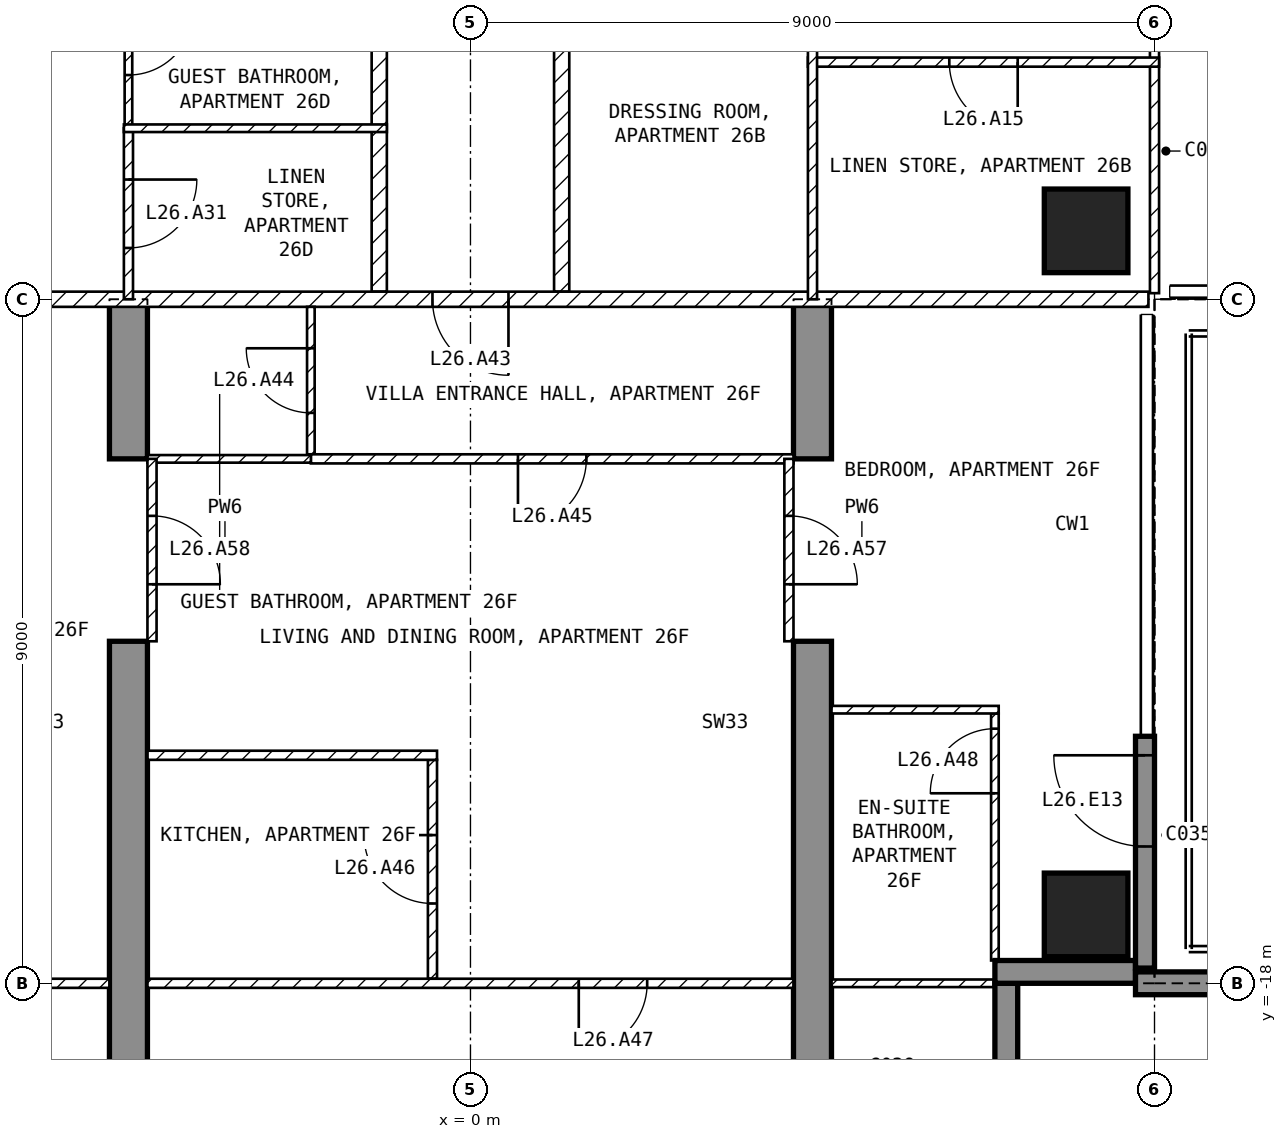
"""IFC4 building model, lengths in metres.
Left out: names, types, materials, properties, quantities, classifications, styles, units other than length and angle.
Written with IfcOpenShell. Run it as: python <this file> out.ifc"""

import sys

from ifc_helpers import new_model, si_unit, direction, frame, frame_2d, origin, origin_2d, place, context, subcontext, project, spatial, polyline, rectangle, outline, extrude, element, fill, save


model = new_model("IFC4")
c1 = context("Model", 3, precision=1e-05, world=origin(), true_north=direction((0.0, 1.0)))
c2 = subcontext(c1, "Body", "Model", "MODEL_VIEW")
j1 = project(units=[si_unit("LENGTHUNIT", "METRE"), si_unit("PLANEANGLEUNIT", "RADIAN")], contexts=[c1])
p1 = place(None, origin())
s1 = spatial("IfcSite", under=j1, at=p1, CompositionType="ELEMENT")
p2 = place(p1, origin())
s2 = spatial("IfcBuilding", under=s1, at=p2, CompositionType="ELEMENT")
p3 = place(p2, frame((0.0, 0.0, 112.9)))
s3 = spatial("IfcBuildingStorey", under=s2, at=p3, CompositionType="ELEMENT", Elevation=112.9)
for number, where, z_axis, x_axis in (
    (1, (8.1, -17.1, -0.25), (0.0, 0.0, 1.0), (1.0, 0.0, 0.0)),
    (2, (8.1, -8.1, -0.25), (0.0, 0.0, 1.0), (1.0, 0.0, 0.0)),
):
    element("IfcColumn", number, at=place(p3, frame(where, z_axis=z_axis, x_axis=x_axis)), inside=s3, PredefinedType="COLUMN", context=c2, shape_type="SweptSolid", body=[
        extrude(rectangle(XDim=1.1, YDim=1.1, at=origin_2d()), origin(), (0.0, 0.0, 1.0), 3.5),
    ])
for number, where, z_axis, x_axis in (
    (3, (-4.75, -20.15, -0.25), (1.0, 0.0, 0.0), (0.0, 1.0, 0.0)),
    (4, (4.25, -20.15, -0.25), (1.0, 0.0, 0.0), (0.0, 1.0, 0.0)),
):
    element("IfcWall", number, at=place(p3, frame(where, z_axis=z_axis, x_axis=x_axis)), inside=s3, PredefinedType="SHEAR", context=c2, shape_type="SweptSolid", body=[
        extrude(outline(polyline([(0.0, 0.0), (6.65, 0.0), (6.65, 2.65), (9.05, 2.65), (9.05, 0.0), (11.15, 0.0), (11.15, 3.5), (0.0, 3.5), (0.0, 0.0)])), origin(), (0.0, 0.0, 1.0), 0.5),
    ])
p4 = place(p3, frame((8.875, -17.8, 0.0), z_axis=(0.0, 0.0, 1.0), x_axis=(0.0, 1.0, 0.0)))
e5 = element("IfcWall", 5, at=p4, inside=s3, PredefinedType="SOLIDWALL", context=c2, shape_type="SweptSolid", body=[
    extrude(rectangle(XDim=3.05, YDim=0.25, at=frame_2d((1.525, 0.0))), origin(), (0.0, 0.0, 1.0), 3.25),
])
p5 = place(p4, frame((1.6, 0.0, 0.0)))
e6 = element("IfcOpeningElement", 6, at=p5, cuts=e5, PredefinedType="OPENING", context=c2, shape_type="SweptSolid", body=[
    extrude(rectangle(XDim=1.2, YDim=2.4, at=frame_2d((0.6, 1.2))), frame((0.0, 0.135, 0.0), z_axis=(0.0, -1.0, 0.0), x_axis=(1.0, 0.0, 0.0)), (0.0, 0.0, 1.0), 0.27),
])
p6 = place(p3, frame((7.05, -19.8, 0.0), z_axis=(0.0, 0.0, 1.0), x_axis=(0.0, 1.0, 0.0)))
e7 = element("IfcWall", 7, at=p6, inside=s3, PredefinedType="SOLIDWALL", context=c2, shape_type="SweptSolid", body=[
    extrude(rectangle(XDim=1.8, YDim=0.3, at=frame_2d((0.9, 0.0))), origin(), (0.0, 0.0, 1.0), 3.25),
])
p7 = place(p3, frame((6.9, -17.85, 0.0), z_axis=(0.0, 0.0, 1.0), x_axis=(1.0, 0.0, 0.0)))
e8 = element("IfcWall", 8, at=p7, inside=s3, PredefinedType="SOLIDWALL", context=c2, shape_type="SweptSolid", body=[
    extrude(rectangle(XDim=1.85, YDim=0.3, at=frame_2d((0.925, 0.0))), origin(), (0.0, 0.0, 1.0), 3.25),
])
p8 = place(p3, frame((8.75, -18.0, 0.0), z_axis=(0.0, 0.0, 1.0), x_axis=(1.0, 0.0, 0.0)))
e9 = element("IfcWall", 9, at=p8, inside=s3, PredefinedType="SOLIDWALL", context=c2, shape_type="SweptSolid", body=[
    extrude(rectangle(XDim=2.99, YDim=0.3, at=frame_2d((1.495, 0.0))), origin(), (0.0, 0.0, 1.0), 3.25),
])
for number, where, z_axis, x_axis in (
    (10, (1.2, -4.6, 0.0), (0.0, 0.0, 1.0), (0.0, -1.0, 0.0)),
    (11, (-1.2, -8.9, 0.0), (0.0, 0.0, 1.0), (0.0, 1.0, 0.0)),
):
    element("IfcWall", number, at=place(p3, frame(where, z_axis=z_axis, x_axis=x_axis)), inside=s3, PredefinedType="PARTITIONING", context=c2, shape_type="SweptSolid", body=[
        extrude(rectangle(XDim=4.3, YDim=0.2, at=frame_2d((2.15, 0.0))), origin(), (0.0, 0.0, 1.0), 3.25),
    ])
p9 = place(p3, frame((8.92, -9.0, 0.0), z_axis=(0.0, 0.0, 1.0), x_axis=(-1.0, 0.0, 0.0)))
e12 = element("IfcWall", 12, at=p9, inside=s3, PredefinedType="PARTITIONING", context=c2, shape_type="SweptSolid", body=[
    extrude(rectangle(XDim=17.84, YDim=0.2, at=frame_2d((8.92, 0.0))), origin(), (0.0, 0.0, 1.0), 3.25),
])
p10 = place(p9, frame((8.42, 0.0, 0.0)))
e13 = element("IfcOpeningElement", 13, at=p10, cuts=e12, PredefinedType="OPENING", context=c2, shape_type="SweptSolid", body=[
    extrude(rectangle(XDim=1.0, YDim=2.1, at=frame_2d((0.5, 1.05))), frame((0.0, 0.11, 0.0), z_axis=(0.0, -1.0, 0.0), x_axis=(1.0, 0.0, 0.0)), (0.0, 0.0, 1.0), 0.22),
])
p11 = place(p3, frame((9.0, -8.92, 0.0), z_axis=(0.0, 0.0, 1.0), x_axis=(0.0, 1.0, 0.0)))
e14 = element("IfcWall", 14, at=p11, inside=s3, PredefinedType="PARTITIONING", context=c2, shape_type="SweptSolid", body=[
    extrude(rectangle(XDim=7.62, YDim=0.12, at=frame_2d((3.81, 0.0))), origin(), (0.0, 0.0, 1.0), 3.25),
])
p12 = place(p11, frame((5.12, 0.0, 0.0)))
e15 = element("IfcOpeningElement", 15, at=p12, cuts=e14, PredefinedType="OPENING", context=c2, shape_type="SweptSolid", body=[
    extrude(rectangle(XDim=0.9, YDim=2.1, at=frame_2d((0.45, 1.05))), frame((0.0, 0.07, 0.0), z_axis=(0.0, -1.0, 0.0), x_axis=(1.0, 0.0, 0.0)), (0.0, 0.0, 1.0), 0.14),
])
p13 = place(p3, frame((9.06, -5.88, 0.0), z_axis=(0.0, 0.0, 1.0), x_axis=(-1.0, 0.0, 0.0)))
e16 = element("IfcWall", 16, at=p13, inside=s3, PredefinedType="PARTITIONING", context=c2, shape_type="SweptSolid", body=[
    extrude(rectangle(XDim=4.62, YDim=0.12, at=frame_2d((2.31, 0.0))), origin(), (0.0, 0.0, 1.0), 3.25),
])
p14 = place(p13, frame((1.86, 0.0, 0.0)))
e17 = element("IfcOpeningElement", 17, at=p14, cuts=e16, PredefinedType="OPENING", context=c2, shape_type="SweptSolid", body=[
    extrude(rectangle(XDim=0.9, YDim=2.1, at=frame_2d((0.45, 1.05))), frame((0.0, 0.07, 0.0), z_axis=(0.0, -1.0, 0.0), x_axis=(1.0, 0.0, 0.0)), (0.0, 0.0, 1.0), 0.14),
])
p15 = place(p3, frame((4.5, -9.0, 0.0), z_axis=(0.0, 0.0, 1.0), x_axis=(0.0, 1.0, 0.0)))
e18 = element("IfcWall", 18, at=p15, inside=s3, PredefinedType="PARTITIONING", context=c2, shape_type="SweptSolid", body=[
    extrude(rectangle(XDim=4.5, YDim=0.12, at=frame_2d((2.25, 0.0))), origin(), (0.0, 0.0, 1.0), 3.25),
])
p16 = place(p15, frame((3.36, 0.0, 0.0)))
e19 = element("IfcOpeningElement", 19, at=p16, cuts=e18, PredefinedType="OPENING", context=c2, shape_type="SweptSolid", body=[
    extrude(rectangle(XDim=0.9, YDim=2.1, at=frame_2d((0.45, 1.05))), frame((0.0, 0.07, 0.0), z_axis=(0.0, -1.0, 0.0), x_axis=(1.0, 0.0, 0.0)), (0.0, 0.0, 1.0), 0.14),
])
p17 = place(p3, frame((-4.5, -4.5, 0.0), z_axis=(0.0, 0.0, 1.0), x_axis=(0.0, -1.0, 0.0)))
e20 = element("IfcWall", 20, at=p17, inside=s3, PredefinedType="PARTITIONING", context=c2, shape_type="SweptSolid", body=[
    extrude(rectangle(XDim=2.25, YDim=0.1, at=frame_2d((1.125, 0.0))), origin(), (0.0, 0.0, 1.0), 3.25),
])
p18 = place(p17, frame((0.7, 0.0, 0.0)))
e21 = element("IfcOpeningElement", 21, at=p18, cuts=e20, PredefinedType="OPENING", context=c2, shape_type="SweptSolid", body=[
    extrude(rectangle(XDim=0.85, YDim=2.1, at=frame_2d((0.425, 1.05))), frame((0.0, 0.06, 0.0), z_axis=(0.0, -1.0, 0.0), x_axis=(1.0, 0.0, 0.0)), (0.0, 0.0, 1.0), 0.12),
])
p19 = place(p3, frame((-4.5, -6.75, 0.0), z_axis=(0.0, 0.0, 1.0), x_axis=(0.0, -1.0, 0.0)))
e22 = element("IfcWall", 22, at=p19, inside=s3, PredefinedType="PARTITIONING", context=c2, shape_type="SweptSolid", body=[
    extrude(rectangle(XDim=2.25, YDim=0.12, at=frame_2d((1.125, 0.0))), origin(), (0.0, 0.0, 1.0), 3.25),
])
p20 = place(p19, frame((0.675, 0.0, 0.0)))
e23 = element("IfcOpeningElement", 23, at=p20, cuts=e22, PredefinedType="OPENING", context=c2, shape_type="SweptSolid", body=[
    extrude(rectangle(XDim=0.9, YDim=2.1, at=frame_2d((0.45, 1.05))), frame((0.0, 0.07, 0.0), z_axis=(0.0, -1.0, 0.0), x_axis=(1.0, 0.0, 0.0)), (0.0, 0.0, 1.0), 0.14),
])
p21 = place(p3, frame((-1.1, -6.75, 0.0), z_axis=(0.0, 0.0, 1.0), x_axis=(-1.0, 0.0, 0.0)))
e24 = element("IfcWall", 24, at=p21, inside=s3, PredefinedType="PARTITIONING", context=c2, shape_type="SweptSolid", body=[
    extrude(rectangle(XDim=3.46, YDim=0.1, at=frame_2d((1.73, 0.0))), origin(), (0.0, 0.0, 1.0), 3.25),
])
p22 = place(p3, frame((-2.1, -11.04, 0.0), z_axis=(0.0, 0.0, 1.0), x_axis=(0.0, 1.0, 0.0)))
e25 = element("IfcWall", 25, at=p22, inside=s3, PredefinedType="PARTITIONING", context=c2, shape_type="SweptSolid", body=[
    extrude(rectangle(XDim=1.94, YDim=0.1, at=frame_2d((0.97, 0.0))), origin(), (0.0, 0.0, 1.0), 3.25),
])
p23 = place(p22, frame((0.545, 0.0, 0.0)))
e26 = element("IfcOpeningElement", 26, at=p23, cuts=e25, PredefinedType="OPENING", context=c2, shape_type="SweptSolid", body=[
    extrude(rectangle(XDim=0.85, YDim=2.1, at=frame_2d((0.425, 1.05))), frame((0.0, 0.06, 0.0), z_axis=(0.0, -1.0, 0.0), x_axis=(1.0, 0.0, 0.0)), (0.0, 0.0, 1.0), 0.12),
])
p24 = place(p3, frame((4.25, -11.1, 0.0), z_axis=(0.0, 0.0, 1.0), x_axis=(-1.0, 0.0, 0.0)))
e27 = element("IfcWall", 27, at=p24, inside=s3, PredefinedType="PARTITIONING", context=c2, shape_type="SweptSolid", body=[
    extrude(rectangle(XDim=6.35, YDim=0.12, at=frame_2d((3.175, 0.0))), origin(), (0.0, 0.0, 1.0), 3.25),
])
p25 = place(p24, frame((2.725, 0.0, 0.0)))
e28 = element("IfcOpeningElement", 28, at=p25, cuts=e27, PredefinedType="OPENING", context=c2, shape_type="SweptSolid", body=[
    extrude(rectangle(XDim=0.9, YDim=2.1, at=frame_2d((0.45, 1.05))), frame((0.0, 0.07, 0.0), z_axis=(0.0, -1.0, 0.0), x_axis=(1.0, 0.0, 0.0)), (0.0, 0.0, 1.0), 0.14),
])
p26 = place(p3, frame((-2.1, -11.1, 0.0), z_axis=(0.0, 0.0, 1.0), x_axis=(-1.0, 0.0, 0.0)))
e29 = element("IfcWall", 29, at=p26, inside=s3, PredefinedType="PARTITIONING", context=c2, shape_type="SweptSolid", body=[
    extrude(rectangle(XDim=2.15, YDim=0.1, at=frame_2d((1.075, 0.0))), origin(), (0.0, 0.0, 1.0), 3.25),
])
p27 = place(p3, frame((-0.5, -17.94, 0.0), z_axis=(0.0, 0.0, 1.0), x_axis=(0.0, 1.0, 0.0)))
e30 = element("IfcWall", 30, at=p27, inside=s3, PredefinedType="PARTITIONING", context=c2, shape_type="SweptSolid", body=[
    extrude(rectangle(XDim=2.88, YDim=0.12, at=frame_2d((1.44, 0.0))), origin(), (0.0, 0.0, 1.0), 3.25),
])
p28 = place(p27, frame((0.99, 0.0, 0.0)))
e31 = element("IfcOpeningElement", 31, at=p28, cuts=e30, PredefinedType="OPENING", context=c2, shape_type="SweptSolid", body=[
    extrude(rectangle(XDim=0.9, YDim=2.1, at=frame_2d((0.45, 1.05))), frame((0.0, 0.07, 0.0), z_axis=(0.0, -1.0, 0.0), x_axis=(1.0, 0.0, 0.0)), (0.0, 0.0, 1.0), 0.14),
])
p29 = place(p3, frame((-0.44, -15.0, 0.0), z_axis=(0.0, 0.0, 1.0), x_axis=(-1.0, 0.0, 0.0)))
e32 = element("IfcWall", 32, at=p29, inside=s3, PredefinedType="PARTITIONING", context=c2, shape_type="SweptSolid", body=[
    extrude(rectangle(XDim=3.81, YDim=0.12, at=frame_2d((1.905, 0.0))), origin(), (0.0, 0.0, 1.0), 3.25),
])
p30 = place(p3, frame((4.25, -18.0, 0.0), z_axis=(0.0, 0.0, 1.0), x_axis=(-1.0, 0.0, 0.0)))
e33 = element("IfcWall", 33, at=p30, inside=s3, PredefinedType="PARTITIONING", context=c2, shape_type="SweptSolid", body=[
    extrude(rectangle(XDim=8.5, YDim=0.12, at=frame_2d((4.25, 0.0))), origin(), (0.0, 0.0, 1.0), 3.25),
])
p31 = place(p30, frame((1.925, 0.0, 0.0)))
e34 = element("IfcOpeningElement", 34, at=p31, cuts=e33, PredefinedType="OPENING", context=c2, shape_type="SweptSolid", body=[
    extrude(rectangle(XDim=0.9, YDim=2.1, at=frame_2d((0.45, 1.05))), frame((0.0, 0.07, 0.0), z_axis=(0.0, -1.0, 0.0), x_axis=(1.0, 0.0, 0.0)), (0.0, 0.0, 1.0), 0.14),
])
p32 = place(p3, frame((6.9, -17.7, 0.0), z_axis=(0.0, 0.0, 1.0), x_axis=(0.0, 1.0, 0.0)))
e35 = element("IfcWall", 35, at=p32, inside=s3, PredefinedType="PARTITIONING", context=c2, shape_type="SweptSolid", body=[
    extrude(rectangle(XDim=3.25, YDim=0.1, at=frame_2d((1.625, 0.0))), origin(), (0.0, 0.0, 1.0), 3.25),
])
p33 = place(p32, frame((2.2, 0.0, 0.0)))
e36 = element("IfcOpeningElement", 36, at=p33, cuts=e35, PredefinedType="OPENING", context=c2, shape_type="SweptSolid", body=[
    extrude(rectangle(XDim=0.85, YDim=2.1, at=frame_2d((0.425, 1.05))), frame((0.0, 0.06, 0.0), z_axis=(0.0, -1.0, 0.0), x_axis=(1.0, 0.0, 0.0)), (0.0, 0.0, 1.0), 0.12),
])
p34 = place(p3, frame((6.95, -14.4, 0.0), z_axis=(0.0, 0.0, 1.0), x_axis=(-1.0, 0.0, 0.0)))
e37 = element("IfcWall", 37, at=p34, inside=s3, PredefinedType="PARTITIONING", context=c2, shape_type="SweptSolid", body=[
    extrude(rectangle(XDim=2.2, YDim=0.1, at=frame_2d((1.1, 0.0))), origin(), (0.0, 0.0, 1.0), 3.25),
])
p35 = place(p3, frame((7.12, -18.0, 0.0), z_axis=(0.0, 0.0, 1.0), x_axis=(-1.0, 0.0, 0.0)))
e38 = element("IfcWall", 38, at=p35, inside=s3, PredefinedType="PARTITIONING", context=c2, shape_type="SweptSolid", body=[
    extrude(rectangle(XDim=2.37, YDim=0.1, at=frame_2d((1.185, 0.0))), origin(), (0.0, 0.0, 1.0), 3.25),
])
p36 = place(p3, frame((-4.75, -18.0, 0.0), z_axis=(0.0, 0.0, 1.0), x_axis=(-1.0, 0.0, 0.0)))
e39 = element("IfcWall", 39, at=p36, inside=s3, PredefinedType="PARTITIONING", context=c2, shape_type="SweptSolid", body=[
    extrude(rectangle(XDim=2.37, YDim=0.12, at=frame_2d((1.185, 0.0))), origin(), (0.0, 0.0, 1.0), 3.25),
])
p37 = place(p3, frame((4.19, -11.1, 0.0), z_axis=(0.0, 0.0, 1.0), x_axis=(0.0, -1.0, 0.0)))
e40 = element("IfcWall", 40, at=p37, inside=s3, PredefinedType="PARTITIONING", context=c2, shape_type="SweptSolid", body=[
    extrude(rectangle(XDim=2.4, YDim=0.12, at=frame_2d((1.2, 0.0))), origin(), (0.0, 0.0, 1.0), 2.4),
])
p38 = place(p37, frame((0.75, 0.0, 0.0)))
e41 = element("IfcOpeningElement", 41, at=p38, cuts=e40, PredefinedType="OPENING", context=c2, shape_type="SweptSolid", body=[
    extrude(rectangle(XDim=0.9, YDim=2.1, at=frame_2d((0.45, 1.05))), frame((0.0, 0.07, 0.0), z_axis=(0.0, -1.0, 0.0), x_axis=(1.0, 0.0, 0.0)), (0.0, 0.0, 1.0), 0.14),
])
p39 = place(p3, frame((-4.19, -11.1, 0.0), z_axis=(0.0, 0.0, 1.0), x_axis=(0.0, -1.0, 0.0)))
e42 = element("IfcWall", 42, at=p39, inside=s3, PredefinedType="PARTITIONING", context=c2, shape_type="SweptSolid", body=[
    extrude(rectangle(XDim=2.4, YDim=0.12, at=frame_2d((1.2, 0.0))), origin(), (0.0, 0.0, 1.0), 2.4),
])
p40 = place(p39, frame((0.75, 0.0, 0.0)))
e43 = element("IfcOpeningElement", 43, at=p40, cuts=e42, PredefinedType="OPENING", context=c2, shape_type="SweptSolid", body=[
    extrude(rectangle(XDim=0.9, YDim=2.1, at=frame_2d((0.45, 1.05))), frame((0.0, 0.07, 0.0), z_axis=(0.0, -1.0, 0.0), x_axis=(1.0, 0.0, 0.0)), (0.0, 0.0, 1.0), 0.14),
])
p41 = place(p5, origin())
e44 = element("IfcDoor", 44, at=p41, inside=s3, OperationType="SINGLE_SWING_RIGHT", PredefinedType="DOOR", context=c2, shape_type="SweptSolid", body=[
    extrude(rectangle(XDim=1.2, YDim=2.4, at=frame_2d((0.6, 1.2))), frame((0.0, 0.025, 0.0), z_axis=(0.0, -1.0, 0.0), x_axis=(1.0, 0.0, 0.0)), (0.0, 0.0, 1.0), 0.05),
])
fill(e6, e44)
p42 = place(p14, origin())
e45 = element("IfcDoor", 45, at=p42, inside=s3, OperationType="SINGLE_SWING_LEFT", PredefinedType="DOOR", context=c2, shape_type="SweptSolid", body=[
    extrude(rectangle(XDim=0.9, YDim=2.1, at=frame_2d((0.45, 1.05))), frame((0.0, 0.025, 0.0), z_axis=(0.0, -1.0, 0.0), x_axis=(1.0, 0.0, 0.0)), (0.0, 0.0, 1.0), 0.05),
])
fill(e17, e45)
p43 = place(p18, origin())
e46 = element("IfcDoor", 46, at=p43, inside=s3, OperationType="SINGLE_SWING_LEFT", PredefinedType="DOOR", context=c2, shape_type="SweptSolid", body=[
    extrude(rectangle(XDim=0.85, YDim=2.1, at=frame_2d((0.425, 1.05))), frame((0.0, 0.025, 0.0), z_axis=(0.0, -1.0, 0.0), x_axis=(1.0, 0.0, 0.0)), (0.0, 0.0, 1.0), 0.05),
])
fill(e21, e46)
p44 = place(p20, origin())
e47 = element("IfcDoor", 47, at=p44, inside=s3, OperationType="SINGLE_SWING_LEFT", PredefinedType="DOOR", context=c2, shape_type="SweptSolid", body=[
    extrude(rectangle(XDim=0.9, YDim=2.1, at=frame_2d((0.45, 1.05))), frame((0.0, 0.025, 0.0), z_axis=(0.0, -1.0, 0.0), x_axis=(1.0, 0.0, 0.0)), (0.0, 0.0, 1.0), 0.05),
])
fill(e23, e47)
p45 = place(p10, origin())
e48 = element("IfcDoor", 48, at=p45, inside=s3, OperationType="SINGLE_SWING_LEFT", PredefinedType="DOOR", context=c2, shape_type="SweptSolid", body=[
    extrude(rectangle(XDim=1.0, YDim=2.1, at=frame_2d((0.5, 1.05))), frame((0.0, 0.025, 0.0), z_axis=(0.0, -1.0, 0.0), x_axis=(1.0, 0.0, 0.0)), (0.0, 0.0, 1.0), 0.05),
])
fill(e13, e48)
p46 = place(p23, origin())
e49 = element("IfcDoor", 49, at=p46, inside=s3, OperationType="SINGLE_SWING_RIGHT", PredefinedType="DOOR", context=c2, shape_type="SweptSolid", body=[
    extrude(rectangle(XDim=0.85, YDim=2.1, at=frame_2d((0.425, 1.05))), frame((0.0, 0.025, 0.0), z_axis=(0.0, -1.0, 0.0), x_axis=(1.0, 0.0, 0.0)), (0.0, 0.0, 1.0), 0.05),
])
fill(e26, e49)
p47 = place(p25, origin())
e50 = element("IfcDoor", 50, at=p47, inside=s3, OperationType="SINGLE_SWING_RIGHT", PredefinedType="DOOR", context=c2, shape_type="SweptSolid", body=[
    extrude(rectangle(XDim=0.9, YDim=2.1, at=frame_2d((0.45, 1.05))), frame((0.0, 0.025, 0.0), z_axis=(0.0, -1.0, 0.0), x_axis=(1.0, 0.0, 0.0)), (0.0, 0.0, 1.0), 0.05),
])
fill(e28, e50)
p48 = place(p28, origin())
e51 = element("IfcDoor", 51, at=p48, inside=s3, OperationType="SINGLE_SWING_RIGHT", PredefinedType="DOOR", context=c2, shape_type="SweptSolid", body=[
    extrude(rectangle(XDim=0.9, YDim=2.1, at=frame_2d((0.45, 1.05))), frame((0.0, 0.025, 0.0), z_axis=(0.0, -1.0, 0.0), x_axis=(1.0, 0.0, 0.0)), (0.0, 0.0, 1.0), 0.05),
])
fill(e31, e51)
p49 = place(p31, origin())
e52 = element("IfcDoor", 52, at=p49, inside=s3, OperationType="SINGLE_SWING_RIGHT", PredefinedType="DOOR", context=c2, shape_type="SweptSolid", body=[
    extrude(rectangle(XDim=0.9, YDim=2.1, at=frame_2d((0.45, 1.05))), frame((0.0, 0.025, 0.0), z_axis=(0.0, -1.0, 0.0), x_axis=(1.0, 0.0, 0.0)), (0.0, 0.0, 1.0), 0.05),
])
fill(e34, e52)
p50 = place(p33, origin())
e53 = element("IfcDoor", 53, at=p50, inside=s3, OperationType="SINGLE_SWING_LEFT", PredefinedType="DOOR", context=c2, shape_type="SweptSolid", body=[
    extrude(rectangle(XDim=0.85, YDim=2.1, at=frame_2d((0.425, 1.05))), frame((0.0, 0.025, 0.0), z_axis=(0.0, -1.0, 0.0), x_axis=(1.0, 0.0, 0.0)), (0.0, 0.0, 1.0), 0.05),
])
fill(e36, e53)
p51 = place(p38, origin())
e54 = element("IfcDoor", 54, at=p51, inside=s3, OperationType="SINGLE_SWING_RIGHT", PredefinedType="DOOR", context=c2, shape_type="SweptSolid", body=[
    extrude(rectangle(XDim=0.9, YDim=2.1, at=frame_2d((0.45, 1.05))), frame((0.0, 0.025, 0.0), z_axis=(0.0, -1.0, 0.0), x_axis=(1.0, 0.0, 0.0)), (0.0, 0.0, 1.0), 0.05),
])
fill(e41, e54)
p52 = place(p40, origin())
e55 = element("IfcDoor", 55, at=p52, inside=s3, OperationType="SINGLE_SWING_RIGHT", PredefinedType="DOOR", context=c2, shape_type="SweptSolid", body=[
    extrude(rectangle(XDim=0.9, YDim=2.1, at=frame_2d((0.45, 1.05))), frame((0.0, 0.025, 0.0), z_axis=(0.0, -1.0, 0.0), x_axis=(1.0, 0.0, 0.0)), (0.0, 0.0, 1.0), 0.05),
])
fill(e43, e55)
save(model, sys.argv[1])
